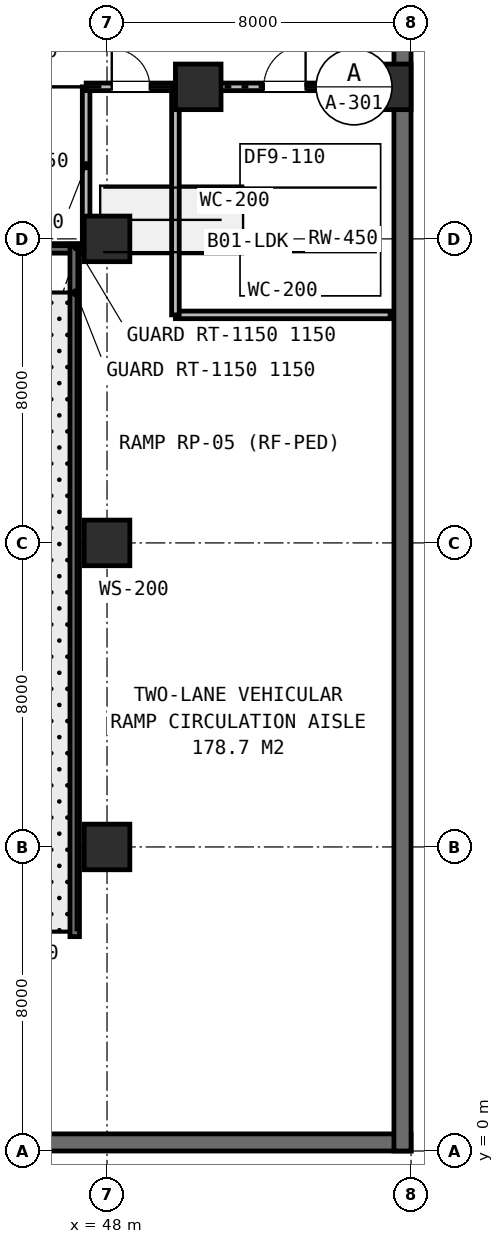
"""IFC4 building model, lengths in metres.
Left out: names, types, materials, properties, quantities, classifications, styles, units other than length and angle.
Written with IfcOpenShell. Run it as: python <this file> out.ifc"""

import sys

from ifc_helpers import new_model, si_unit, direction, frame, frame_2d, origin, origin_2d, place, context, subcontext, project, spatial, rectangle, extrude, element, fill, save


model = new_model("IFC4")
c1 = context("Model", 3, precision=1e-05, world=origin(), true_north=direction((0.0, 1.0)))
c2 = subcontext(c1, "Body", "Model", "MODEL_VIEW")
j1 = project(units=[si_unit("LENGTHUNIT", "METRE"), si_unit("PLANEANGLEUNIT", "RADIAN")], contexts=[c1])
p1 = place(None, origin())
s1 = spatial("IfcSite", under=j1, at=p1, CompositionType="ELEMENT")
p2 = place(p1, origin())
s2 = spatial("IfcBuilding", under=s1, at=p2, CompositionType="ELEMENT")
p3 = place(p2, frame((0.0, 0.0, -5.6)))
s3 = spatial("IfcBuildingStorey", under=s2, at=p3, CompositionType="ELEMENT", Elevation=-5.6)
p4 = place(p3, frame((0.0, 0.225, 0.0), z_axis=(0.0, 0.0, 1.0), x_axis=(1.0, 0.0, 0.0)))
e1 = element("IfcWall", 1, at=p4, inside=s3, PredefinedType="USERDEFINED", context=c2, shape_type="SweptSolid", body=[
    extrude(rectangle(XDim=56.0, YDim=0.45, at=frame_2d((28.0, 0.0))), origin(), (0.0, 0.0, 1.0), 5.6),
])
p5 = place(p3, frame((55.775, 0.0, 0.0), z_axis=(0.0, 0.0, 1.0), x_axis=(0.0, 1.0, 0.0)))
e2 = element("IfcWall", 2, at=p5, inside=s3, PredefinedType="USERDEFINED", context=c2, shape_type="SweptSolid", body=[
    extrude(rectangle(XDim=48.0, YDim=0.45, at=frame_2d((24.0, 0.0))), origin(), (0.0, 0.0, 1.0), 5.6),
])
for number, where, z_axis, x_axis in (
    (3, (50.4, 28.0, 0.0), (0.0, 0.0, 1.0), (1.0, 0.0, 0.0)),
    (4, (55.4, 28.0, 0.0), (0.0, 0.0, 1.0), (1.0, 0.0, 0.0)),
    (5, (48.0, 8.0, 0.0), (0.0, 0.0, 1.0), (1.0, 0.0, 0.0)),
    (6, (48.0, 16.0, 0.0), (0.0, 0.0, 1.0), (1.0, 0.0, 0.0)),
    (7, (48.0, 24.0, 0.0), (0.0, 0.0, 1.0), (1.0, 0.0, 0.0)),
):
    element("IfcColumn", number, at=place(p3, frame(where, z_axis=z_axis, x_axis=x_axis)), inside=s3, PredefinedType="COLUMN", context=c2, shape_type="SweptSolid", body=[
        extrude(rectangle(XDim=1.2, YDim=1.2, at=origin_2d()), origin(), (0.0, 0.0, 1.0), 5.6),
    ])
p6 = place(p3, frame((47.45, 23.85, 0.0), z_axis=(0.0, 0.0, 1.0), x_axis=(0.0, 1.0, 0.0)))
e8 = element("IfcWall", 8, at=p6, inside=s3, PredefinedType="PARTITIONING", context=c2, shape_type="SweptSolid", body=[
    extrude(rectangle(XDim=4.15, YDim=0.2, at=frame_2d((2.075, 0.0))), origin(), (0.0, 0.0, 1.0), 5.27),
])
p7 = place(p3, frame((47.45, 28.0, 0.0), z_axis=(0.0, 0.0, 1.0), x_axis=(1.0, 0.0, 0.0)))
e9 = element("IfcWall", 9, at=p7, inside=s3, PredefinedType="PARTITIONING", context=c2, shape_type="SweptSolid", body=[
    extrude(rectangle(XDim=8.0, YDim=0.2, at=frame_2d((4.0, 0.0))), origin(), (0.0, 0.0, 1.0), 4.66),
])
p8 = place(p7, frame((0.675, 0.0, 0.0)))
e10 = element("IfcOpeningElement", 10, at=p8, cuts=e9, PredefinedType="OPENING", context=c2, shape_type="SweptSolid", body=[
    extrude(rectangle(XDim=1.0, YDim=2.15, at=frame_2d((0.5, 1.075))), frame((0.0, 0.11, 0.0), z_axis=(0.0, -1.0, 0.0), x_axis=(1.0, 0.0, 0.0)), (0.0, 0.0, 1.0), 0.22),
])
p9 = place(p7, frame((4.675, 0.0, 0.0)))
e11 = element("IfcOpeningElement", 11, at=p9, cuts=e9, PredefinedType="OPENING", context=c2, shape_type="SweptSolid", body=[
    extrude(rectangle(XDim=1.1, YDim=2.15, at=frame_2d((0.55, 1.075))), frame((0.0, 0.11, 0.0), z_axis=(0.0, -1.0, 0.0), x_axis=(1.0, 0.0, 0.0)), (0.0, 0.0, 1.0), 0.22),
])
p10 = place(p3, frame((49.8, 22.0, 0.0), z_axis=(0.0, 0.0, 1.0), x_axis=(1.0, 0.0, 0.0)))
e12 = element("IfcWall", 12, at=p10, inside=s3, PredefinedType="PARTITIONING", context=c2, shape_type="SweptSolid", body=[
    extrude(rectangle(XDim=5.65, YDim=0.2, at=frame_2d((2.825, 0.0))), origin(), (0.0, 0.0, 1.0), 5.27),
])
p11 = place(p3, frame((49.8, 22.0, 0.0), z_axis=(0.0, 0.0, 1.0), x_axis=(0.0, 1.0, 0.0)))
e13 = element("IfcWall", 13, at=p11, inside=s3, PredefinedType="PARTITIONING", context=c2, shape_type="SweptSolid", body=[
    extrude(rectangle(XDim=6.0, YDim=0.2, at=frame_2d((3.0, 0.0))), origin(), (0.0, 0.0, 1.0), 5.27),
])
p12 = place(p3, frame((40.0, 23.75, 0.0), z_axis=(0.0, 0.0, 1.0), x_axis=(1.0, 0.0, 0.0)))
e14 = element("IfcWall", 14, at=p12, inside=s3, PredefinedType="STANDARD", context=c2, shape_type="SweptSolid", body=[
    extrude(rectangle(XDim=8.0, YDim=0.25, at=frame_2d((4.0, 0.0))), origin(), (0.0, 0.0, 1.0), 5.28),
])
p13 = place(p3, frame((47.15, 5.64, 0.0), z_axis=(0.0, 0.0, 1.0), x_axis=(0.0, 1.0, 0.0)))
e15 = element("IfcWall", 15, at=p13, inside=s3, PredefinedType="STANDARD", context=c2, shape_type="SweptSolid", body=[
    extrude(rectangle(XDim=18.22, YDim=0.25, at=frame_2d((9.11, 0.0))), origin(), (0.0, 0.0, 1.0), 5.28),
])
p14 = place(p8, origin())
e16 = element("IfcDoor", 16, at=p14, inside=s3, OperationType="SINGLE_SWING_LEFT", PredefinedType="DOOR", context=c2, shape_type="SweptSolid", body=[
    extrude(rectangle(XDim=1.0, YDim=2.15, at=frame_2d((0.5, 1.075))), frame((0.0, 0.025, 0.0), z_axis=(0.0, -1.0, 0.0), x_axis=(1.0, 0.0, 0.0)), (0.0, 0.0, 1.0), 0.05),
])
fill(e10, e16)
p15 = place(p9, origin())
e17 = element("IfcDoor", 17, at=p15, inside=s3, OperationType="SINGLE_SWING_RIGHT", PredefinedType="DOOR", context=c2, shape_type="SweptSolid", body=[
    extrude(rectangle(XDim=1.1, YDim=2.15, at=frame_2d((0.55, 1.075))), frame((0.0, 0.025, 0.0), z_axis=(0.0, -1.0, 0.0), x_axis=(1.0, 0.0, 0.0)), (0.0, 0.0, 1.0), 0.05),
])
fill(e11, e17)
save(model, sys.argv[1])
